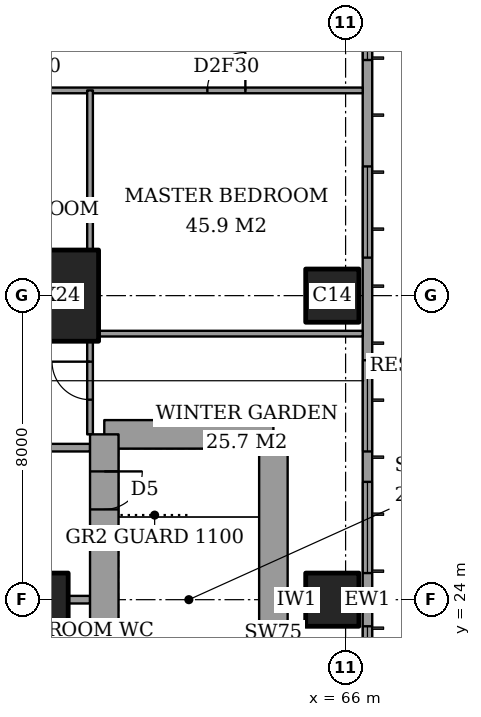
"""IFC4 building model, lengths in metres.
Left out: names, types, materials, properties, quantities, classifications, styles, units other than length and angle.
Written with IfcOpenShell. Run it as: python <this file> out.ifc"""

import sys

from ifc_helpers import new_model, si_unit, direction, frame, frame_2d, origin, origin_2d, place, context, subcontext, project, spatial, rectangle, extrude, element, fill, save


model = new_model("IFC4")
c1 = context("Model", 3, precision=1e-05, world=origin(), true_north=direction((0.0, 1.0)))
c2 = subcontext(c1, "Body", "Model", "MODEL_VIEW")
j1 = project(units=[si_unit("LENGTHUNIT", "METRE"), si_unit("PLANEANGLEUNIT", "RADIAN")], contexts=[c1])
p1 = place(None, origin())
s1 = spatial("IfcSite", under=j1, at=p1, CompositionType="ELEMENT")
p2 = place(p1, origin())
s2 = spatial("IfcBuilding", under=s1, at=p2, CompositionType="ELEMENT")
p3 = place(p2, frame((0.0, 0.0, 287.1)))
s3 = spatial("IfcBuildingStorey", under=s2, at=p3, CompositionType="ELEMENT", Elevation=287.1)
p4 = place(p3, frame((58.0, 24.0, 0.0), z_axis=(0.0, 0.0, 1.0), x_axis=(1.0, 0.0, 0.0)))
e1 = element("IfcColumn", 1, at=p4, inside=s3, PredefinedType="COLUMN", context=c2, shape_type="SweptSolid", body=[
    extrude(rectangle(XDim=1.4, YDim=1.4, at=origin_2d()), origin(), (0.0, 0.0, 1.0), 4.5),
])
p5 = place(p3, frame((58.0, 32.0, 0.0), z_axis=(0.0, 0.0, 1.0), x_axis=(1.0, 0.0, 0.0)))
e2 = element("IfcColumn", 2, at=p5, inside=s3, PredefinedType="COLUMN", context=c2, shape_type="SweptSolid", body=[
    extrude(rectangle(XDim=3.0, YDim=2.4, at=origin_2d()), origin(), (0.0, 0.0, 1.0), 4.5),
])
for number, where, z_axis, x_axis in (
    (3, (65.65, 24.0, 0.0), (0.0, 0.0, 1.0), (1.0, 0.0, 0.0)),
    (4, (65.65, 32.0, 0.0), (0.0, 0.0, 1.0), (1.0, 0.0, 0.0)),
):
    element("IfcColumn", number, at=place(p3, frame(where, z_axis=z_axis, x_axis=x_axis)), inside=s3, PredefinedType="COLUMN", context=c2, shape_type="SweptSolid", body=[
        extrude(rectangle(XDim=1.4, YDim=1.4, at=origin_2d()), origin(), (0.0, 0.0, 1.0), 4.5),
    ])
p6 = place(p3, frame((64.1, 19.65, 0.0), z_axis=(0.0, 0.0, 1.0), x_axis=(0.0, 1.0, 0.0)))
e5 = element("IfcWall", 5, at=p6, inside=s3, PredefinedType="SHEAR", context=c2, shape_type="SweptSolid", body=[
    extrude(rectangle(XDim=8.7, YDim=0.75, at=frame_2d((4.35, 0.0))), origin(), (0.0, 0.0, 1.0), 4.5),
])
p7 = place(p3, frame((64.1, 28.35, 0.0), z_axis=(0.0, 0.0, 1.0), x_axis=(-1.0, 0.0, 0.0)))
e6 = element("IfcWall", 6, at=p7, inside=s3, PredefinedType="SHEAR", context=c2, shape_type="SweptSolid", body=[
    extrude(rectangle(XDim=4.45, YDim=0.75, at=frame_2d((2.225, 0.0))), origin(), (0.0, 0.0, 1.0), 4.5),
])
p8 = place(p3, frame((59.65, 28.35, 0.0), z_axis=(0.0, 0.0, 1.0), x_axis=(0.0, -1.0, 0.0)))
e7 = element("IfcWall", 7, at=p8, inside=s3, PredefinedType="SHEAR", context=c2, shape_type="SweptSolid", body=[
    extrude(rectangle(XDim=8.7, YDim=0.75, at=frame_2d((4.35, 0.0))), origin(), (0.0, 0.0, 1.0), 4.5),
])
p9 = place(p8, frame((0.975, 0.0, 0.0)))
e8 = element("IfcOpeningElement", 8, at=p9, cuts=e7, PredefinedType="OPENING", context=c2, shape_type="SweptSolid", body=[
    extrude(rectangle(XDim=1.0, YDim=2.1, at=frame_2d((0.5, 1.05))), frame((0.0, 0.385, 0.0), z_axis=(0.0, -1.0, 0.0), x_axis=(1.0, 0.0, 0.0)), (0.0, 0.0, 1.0), 0.77),
])
p10 = place(p3, frame((66.575, 3.175, 0.0), z_axis=(0.0, 0.0, 1.0), x_axis=(0.0, 1.0, 0.0)))
e9 = element("IfcWall", 9, at=p10, inside=s3, PredefinedType="SOLIDWALL", context=c2, shape_type="SweptSolid", body=[
    extrude(rectangle(XDim=41.65, YDim=0.25, at=frame_2d((20.825, 0.0))), origin(), (0.0, 0.0, 1.0), 4.5),
])
p11 = place(p10, frame((1.275, 0.0, 0.6)))
e10 = element("IfcOpeningElement", 10, at=p11, cuts=e9, PredefinedType="OPENING", context=c2, shape_type="SweptSolid", body=[
    extrude(rectangle(XDim=2.4, YDim=2.8, at=frame_2d((1.2, 1.4))), frame((0.0, 0.135, 0.0), z_axis=(0.0, -1.0, 0.0), x_axis=(1.0, 0.0, 0.0)), (0.0, 0.0, 1.0), 0.27),
])
p12 = place(p10, frame((5.525, 0.0, 0.6)))
e11 = element("IfcOpeningElement", 11, at=p12, cuts=e9, PredefinedType="OPENING", context=c2, shape_type="SweptSolid", body=[
    extrude(rectangle(XDim=1.2, YDim=2.8, at=frame_2d((0.6, 1.4))), frame((0.0, 0.135, 0.0), z_axis=(0.0, -1.0, 0.0), x_axis=(1.0, 0.0, 0.0)), (0.0, 0.0, 1.0), 0.27),
])
p13 = place(p10, frame((9.425, 0.0, 0.6)))
e12 = element("IfcOpeningElement", 12, at=p13, cuts=e9, PredefinedType="OPENING", context=c2, shape_type="SweptSolid", body=[
    extrude(rectangle(XDim=2.4, YDim=2.8, at=frame_2d((1.2, 1.4))), frame((0.0, 0.135, 0.0), z_axis=(0.0, -1.0, 0.0), x_axis=(1.0, 0.0, 0.0)), (0.0, 0.0, 1.0), 0.27),
])
p14 = place(p10, frame((14.525, 0.0, 0.6)))
e13 = element("IfcOpeningElement", 13, at=p14, cuts=e9, PredefinedType="OPENING", context=c2, shape_type="SweptSolid", body=[
    extrude(rectangle(XDim=2.4, YDim=2.8, at=frame_2d((1.2, 1.4))), frame((0.0, 0.135, 0.0), z_axis=(0.0, -1.0, 0.0), x_axis=(1.0, 0.0, 0.0)), (0.0, 0.0, 1.0), 0.27),
])
p15 = place(p10, frame((17.725, 0.0, 0.6)))
e14 = element("IfcOpeningElement", 14, at=p15, cuts=e9, PredefinedType="OPENING", context=c2, shape_type="SweptSolid", body=[
    extrude(rectangle(XDim=2.4, YDim=2.8, at=frame_2d((1.2, 1.4))), frame((0.0, 0.135, 0.0), z_axis=(0.0, -1.0, 0.0), x_axis=(1.0, 0.0, 0.0)), (0.0, 0.0, 1.0), 0.27),
])
p16 = place(p10, frame((21.525, 0.0, 0.6)))
e15 = element("IfcOpeningElement", 15, at=p16, cuts=e9, PredefinedType="OPENING", context=c2, shape_type="SweptSolid", body=[
    extrude(rectangle(XDim=2.4, YDim=2.8, at=frame_2d((1.2, 1.4))), frame((0.0, 0.135, 0.0), z_axis=(0.0, -1.0, 0.0), x_axis=(1.0, 0.0, 0.0)), (0.0, 0.0, 1.0), 0.27),
])
p17 = place(p10, frame((24.725, 0.0, 0.6)))
e16 = element("IfcOpeningElement", 16, at=p17, cuts=e9, PredefinedType="OPENING", context=c2, shape_type="SweptSolid", body=[
    extrude(rectangle(XDim=2.4, YDim=2.8, at=frame_2d((1.2, 1.4))), frame((0.0, 0.135, 0.0), z_axis=(0.0, -1.0, 0.0), x_axis=(1.0, 0.0, 0.0)), (0.0, 0.0, 1.0), 0.27),
])
p18 = place(p10, frame((29.825, 0.0, 0.6)))
e17 = element("IfcOpeningElement", 17, at=p18, cuts=e9, PredefinedType="OPENING", context=c2, shape_type="SweptSolid", body=[
    extrude(rectangle(XDim=2.4, YDim=2.8, at=frame_2d((1.2, 1.4))), frame((0.0, 0.135, 0.0), z_axis=(0.0, -1.0, 0.0), x_axis=(1.0, 0.0, 0.0)), (0.0, 0.0, 1.0), 0.27),
])
p19 = place(p10, frame((35.025, 0.0, 0.6)))
e18 = element("IfcOpeningElement", 18, at=p19, cuts=e9, PredefinedType="OPENING", context=c2, shape_type="SweptSolid", body=[
    extrude(rectangle(XDim=1.2, YDim=2.8, at=frame_2d((0.6, 1.4))), frame((0.0, 0.135, 0.0), z_axis=(0.0, -1.0, 0.0), x_axis=(1.0, 0.0, 0.0)), (0.0, 0.0, 1.0), 0.27),
])
p20 = place(p10, frame((38.075, 0.0, 0.6)))
e19 = element("IfcOpeningElement", 19, at=p20, cuts=e9, PredefinedType="OPENING", context=c2, shape_type="SweptSolid", body=[
    extrude(rectangle(XDim=2.4, YDim=2.8, at=frame_2d((1.2, 1.4))), frame((0.0, 0.135, 0.0), z_axis=(0.0, -1.0, 0.0), x_axis=(1.0, 0.0, 0.0)), (0.0, 0.0, 1.0), 0.27),
])
p21 = place(p3, frame((58.7, 24.0, 0.0), z_axis=(0.0, 0.0, 1.0), x_axis=(1.0, 0.0, 0.0)))
e20 = element("IfcWall", 20, at=p21, inside=s3, PredefinedType="PARTITIONING", context=c2, shape_type="SweptSolid", body=[
    extrude(rectangle(XDim=0.575, YDim=0.2, at=frame_2d((0.288, 0.0))), origin(), (0.0, 0.0, 1.0), 4.2),
])
p22 = place(p3, frame((64.475, 24.0, 0.0), z_axis=(0.0, 0.0, 1.0), x_axis=(1.0, 0.0, 0.0)))
e21 = element("IfcWall", 21, at=p22, inside=s3, PredefinedType="PARTITIONING", context=c2, shape_type="SweptSolid", body=[
    extrude(rectangle(XDim=0.475, YDim=0.15, at=frame_2d((0.237, 0.0))), origin(), (0.0, 0.0, 1.0), 4.2),
])
p23 = place(p3, frame((42.0, 28.0, 0.0), z_axis=(0.0, 0.0, 1.0), x_axis=(1.0, 0.0, 0.0)))
e22 = element("IfcWall", 22, at=p23, inside=s3, PredefinedType="PARTITIONING", context=c2, shape_type="SweptSolid", body=[
    extrude(rectangle(XDim=17.275, YDim=0.2, at=frame_2d((8.637, 0.0))), origin(), (0.0, 0.0, 1.0), 4.2),
])
p24 = place(p23, frame((9.4, 0.0, 0.0)))
e23 = element("IfcOpeningElement", 23, at=p24, cuts=e22, PredefinedType="OPENING", context=c2, shape_type="SweptSolid", body=[
    extrude(rectangle(XDim=1.2, YDim=2.4, at=frame_2d((0.6, 1.2))), frame((0.0, 0.11, 0.0), z_axis=(0.0, -1.0, 0.0), x_axis=(1.0, 0.0, 0.0)), (0.0, 0.0, 1.0), 0.22),
])
p25 = place(p3, frame((59.5, 31.0, 0.0), z_axis=(0.0, 0.0, 1.0), x_axis=(1.0, 0.0, 0.0)))
e24 = element("IfcWall", 24, at=p25, inside=s3, PredefinedType="PARTITIONING", context=c2, shape_type="SweptSolid", body=[
    extrude(rectangle(XDim=6.95, YDim=0.15, at=frame_2d((3.475, 0.0))), origin(), (0.0, 0.0, 1.0), 4.2),
])
p26 = place(p3, frame((41.439, 37.4, 0.0), z_axis=(0.0, 0.0, 1.0), x_axis=(1.0, 0.0, 0.0)))
e25 = element("IfcWall", 25, at=p26, inside=s3, PredefinedType="PARTITIONING", context=c2, shape_type="SweptSolid", body=[
    extrude(rectangle(XDim=25.011, YDim=0.15, at=frame_2d((12.505, 0.0))), origin(), (0.0, 0.0, 1.0), 4.2),
])
p27 = place(p26, frame((10.761, 0.0, 0.0)))
e26 = element("IfcOpeningElement", 26, at=p27, cuts=e25, PredefinedType="OPENING", context=c2, shape_type="SweptSolid", body=[
    extrude(rectangle(XDim=1.0, YDim=2.1, at=frame_2d((0.5, 1.05))), frame((0.0, 0.085, 0.0), z_axis=(0.0, -1.0, 0.0), x_axis=(1.0, 0.0, 0.0)), (0.0, 0.0, 1.0), 0.17),
])
p28 = place(p26, frame((20.924, 0.0, 0.0)))
e27 = element("IfcOpeningElement", 27, at=p28, cuts=e25, PredefinedType="OPENING", context=c2, shape_type="SweptSolid", body=[
    extrude(rectangle(XDim=1.0, YDim=2.1, at=frame_2d((0.5, 1.05))), frame((0.0, 0.085, 0.0), z_axis=(0.0, -1.0, 0.0), x_axis=(1.0, 0.0, 0.0)), (0.0, 0.0, 1.0), 0.17),
])
p29 = place(p26, frame((15.749, 0.0, 0.0)))
e28 = element("IfcOpeningElement", 28, at=p29, cuts=e25, PredefinedType="OPENING", context=c2, shape_type="SweptSolid", body=[
    extrude(rectangle(XDim=0.9, YDim=2.1, at=frame_2d((0.45, 1.05))), frame((0.0, 0.085, 0.0), z_axis=(0.0, -1.0, 0.0), x_axis=(1.0, 0.0, 0.0)), (0.0, 0.0, 1.0), 0.17),
])
p30 = place(p26, frame((12.961, 0.0, 0.0)))
e29 = element("IfcOpeningElement", 29, at=p30, cuts=e25, PredefinedType="OPENING", context=c2, shape_type="SweptSolid", body=[
    extrude(rectangle(XDim=1.0, YDim=2.1, at=frame_2d((0.5, 1.05))), frame((0.0, 0.085, 0.0), z_axis=(0.0, -1.0, 0.0), x_axis=(1.0, 0.0, 0.0)), (0.0, 0.0, 1.0), 0.17),
])
p31 = place(p26, frame((7.911, 0.0, 0.0)))
e30 = element("IfcOpeningElement", 30, at=p31, cuts=e25, PredefinedType="OPENING", context=c2, shape_type="SweptSolid", body=[
    extrude(rectangle(XDim=0.9, YDim=2.1, at=frame_2d((0.45, 1.05))), frame((0.0, 0.085, 0.0), z_axis=(0.0, -1.0, 0.0), x_axis=(1.0, 0.0, 0.0)), (0.0, 0.0, 1.0), 0.17),
])
p32 = place(p26, frame((2.836, 0.0, 0.0)))
e31 = element("IfcOpeningElement", 31, at=p32, cuts=e25, PredefinedType="OPENING", context=c2, shape_type="SweptSolid", body=[
    extrude(rectangle(XDim=1.0, YDim=2.1, at=frame_2d((0.5, 1.05))), frame((0.0, 0.085, 0.0), z_axis=(0.0, -1.0, 0.0), x_axis=(1.0, 0.0, 0.0)), (0.0, 0.0, 1.0), 0.17),
])
p33 = place(p3, frame((59.275, 28.35, 0.0), z_axis=(0.0, 0.0, 1.0), x_axis=(0.0, 1.0, 0.0)))
e32 = element("IfcWall", 32, at=p33, inside=s3, PredefinedType="PARTITIONING", context=c2, shape_type="SweptSolid", body=[
    extrude(rectangle(XDim=2.45, YDim=0.15, at=frame_2d((1.225, 0.0))), origin(), (0.0, 0.0, 1.0), 4.2),
])
p34 = place(p33, frame((0.913, 0.0, 0.0)))
e33 = element("IfcOpeningElement", 33, at=p34, cuts=e32, PredefinedType="OPENING", context=c2, shape_type="SweptSolid", body=[
    extrude(rectangle(XDim=1.0, YDim=2.1, at=frame_2d((0.5, 1.05))), frame((0.0, 0.085, 0.0), z_axis=(0.0, -1.0, 0.0), x_axis=(1.0, 0.0, 0.0)), (0.0, 0.0, 1.0), 0.17),
])
p35 = place(p3, frame((59.275, 33.2, 0.0), z_axis=(0.0, 0.0, 1.0), x_axis=(0.0, 1.0, 0.0)))
e34 = element("IfcWall", 34, at=p35, inside=s3, PredefinedType="PARTITIONING", context=c2, shape_type="SweptSolid", body=[
    extrude(rectangle(XDim=4.2, YDim=0.15, at=frame_2d((2.1, 0.0))), origin(), (0.0, 0.0, 1.0), 4.2),
])
p36 = place(p15, origin())
e35 = element("IfcWindow", 35, at=p36, inside=s3, PartitioningType="SINGLE_PANEL", PredefinedType="WINDOW", context=c2, shape_type="SweptSolid", body=[
    extrude(rectangle(XDim=2.4, YDim=2.8, at=frame_2d((1.2, 1.4))), frame((0.0, 0.03, 0.0), z_axis=(0.0, -1.0, 0.0), x_axis=(1.0, 0.0, 0.0)), (0.0, 0.0, 1.0), 0.06),
])
fill(e14, e35)
p37 = place(p16, origin())
e36 = element("IfcWindow", 36, at=p37, inside=s3, PartitioningType="SINGLE_PANEL", PredefinedType="WINDOW", context=c2, shape_type="SweptSolid", body=[
    extrude(rectangle(XDim=2.4, YDim=2.8, at=frame_2d((1.2, 1.4))), frame((0.0, 0.03, 0.0), z_axis=(0.0, -1.0, 0.0), x_axis=(1.0, 0.0, 0.0)), (0.0, 0.0, 1.0), 0.06),
])
fill(e15, e36)
p38 = place(p17, origin())
e37 = element("IfcWindow", 37, at=p38, inside=s3, PartitioningType="SINGLE_PANEL", PredefinedType="WINDOW", context=c2, shape_type="SweptSolid", body=[
    extrude(rectangle(XDim=2.4, YDim=2.8, at=frame_2d((1.2, 1.4))), frame((0.0, 0.03, 0.0), z_axis=(0.0, -1.0, 0.0), x_axis=(1.0, 0.0, 0.0)), (0.0, 0.0, 1.0), 0.06),
])
fill(e16, e37)
p39 = place(p18, origin())
e38 = element("IfcWindow", 38, at=p39, inside=s3, PartitioningType="SINGLE_PANEL", PredefinedType="WINDOW", context=c2, shape_type="SweptSolid", body=[
    extrude(rectangle(XDim=2.4, YDim=2.8, at=frame_2d((1.2, 1.4))), frame((0.0, 0.03, 0.0), z_axis=(0.0, -1.0, 0.0), x_axis=(1.0, 0.0, 0.0)), (0.0, 0.0, 1.0), 0.06),
])
fill(e17, e38)
p40 = place(p19, origin())
e39 = element("IfcWindow", 39, at=p40, inside=s3, PartitioningType="SINGLE_PANEL", PredefinedType="WINDOW", context=c2, shape_type="SweptSolid", body=[
    extrude(rectangle(XDim=1.2, YDim=2.8, at=frame_2d((0.6, 1.4))), frame((0.0, 0.03, 0.0), z_axis=(0.0, -1.0, 0.0), x_axis=(1.0, 0.0, 0.0)), (0.0, 0.0, 1.0), 0.06),
])
fill(e18, e39)
p41 = place(p28, origin())
e40 = element("IfcDoor", 40, at=p41, inside=s3, OperationType="SINGLE_SWING_LEFT", PredefinedType="DOOR", context=c2, shape_type="SweptSolid", body=[
    extrude(rectangle(XDim=1.0, YDim=2.1, at=frame_2d((0.5, 1.05))), frame((0.0, 0.025, 0.0), z_axis=(0.0, -1.0, 0.0), x_axis=(1.0, 0.0, 0.0)), (0.0, 0.0, 1.0), 0.05),
])
fill(e27, e40)
p42 = place(p34, origin())
e41 = element("IfcDoor", 41, at=p42, inside=s3, OperationType="SINGLE_SWING_LEFT", PredefinedType="DOOR", context=c2, shape_type="SweptSolid", body=[
    extrude(rectangle(XDim=1.0, YDim=2.1, at=frame_2d((0.5, 1.05))), frame((0.0, 0.025, 0.0), z_axis=(0.0, -1.0, 0.0), x_axis=(1.0, 0.0, 0.0)), (0.0, 0.0, 1.0), 0.05),
])
fill(e33, e41)
p43 = place(p9, origin())
e42 = element("IfcDoor", 42, at=p43, inside=s3, OperationType="SINGLE_SWING_RIGHT", PredefinedType="DOOR", context=c2, shape_type="SweptSolid", body=[
    extrude(rectangle(XDim=1.0, YDim=2.1, at=frame_2d((0.5, 1.05))), frame((0.0, 0.025, 0.0), z_axis=(0.0, -1.0, 0.0), x_axis=(1.0, 0.0, 0.0)), (0.0, 0.0, 1.0), 0.05),
])
fill(e8, e42)
save(model, sys.argv[1])
